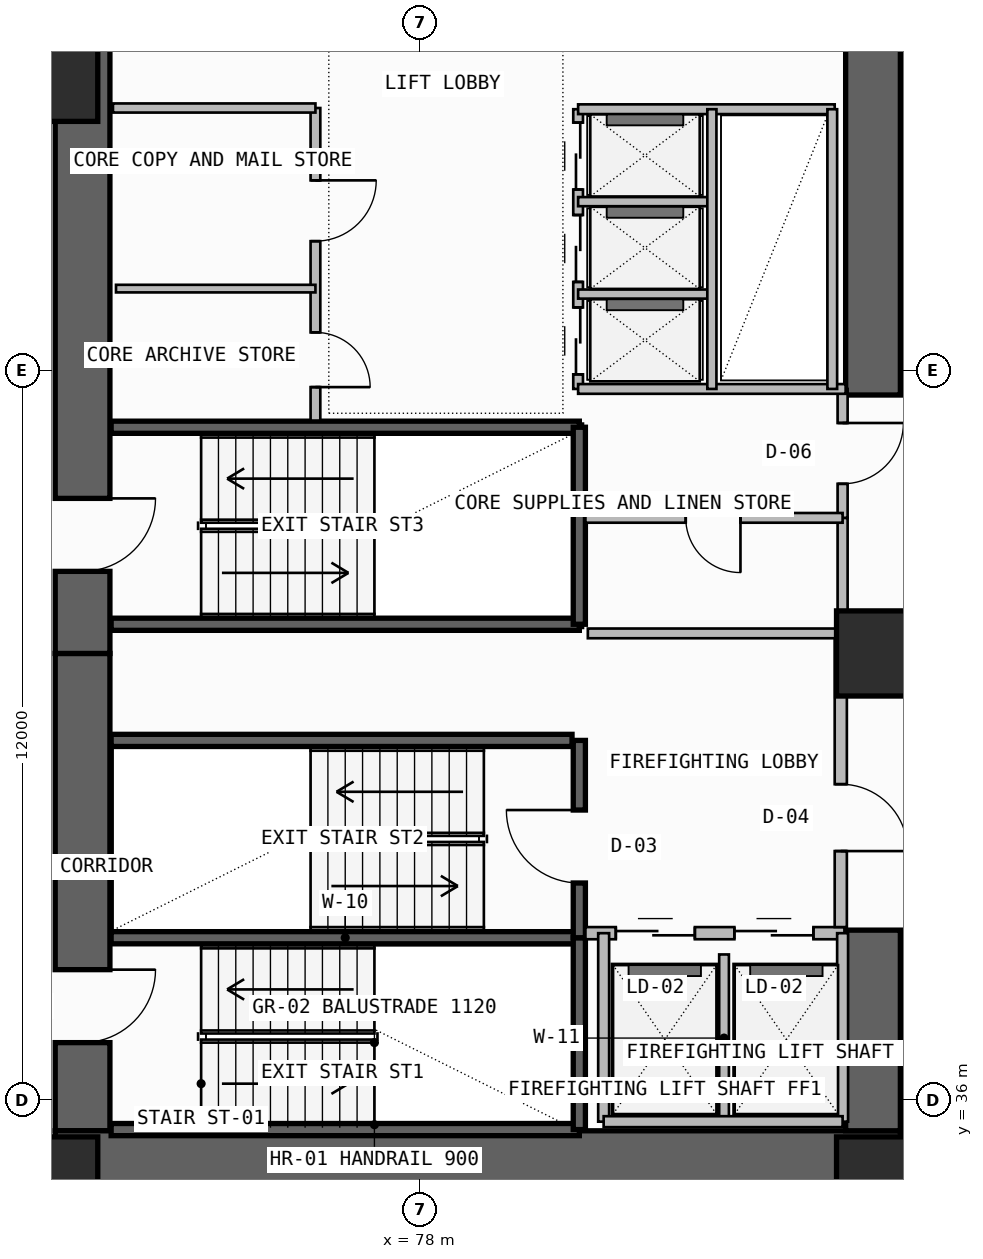
"""IFC4 building model, lengths in metres.
Left out: names, types, materials, properties, quantities, classifications, styles, units other than length and angle.
Written with IfcOpenShell. Run it as: python <this file> out.ifc"""

import sys

from ifc_helpers import new_model, si_unit, direction, frame, frame_2d, origin, origin_2d, place, context, subcontext, project, spatial, rectangle, extrude, element, fill, save


model = new_model("IFC4")
c1 = context("Model", 3, precision=1e-05, world=origin(), true_north=direction((0.0, 1.0)))
c2 = subcontext(c1, "Body", "Model", "MODEL_VIEW")
j1 = project(units=[si_unit("LENGTHUNIT", "METRE"), si_unit("PLANEANGLEUNIT", "RADIAN")], contexts=[c1])
p1 = place(None, origin())
s1 = spatial("IfcSite", under=j1, at=p1, CompositionType="ELEMENT")
p2 = place(p1, origin())
s2 = spatial("IfcBuilding", under=s1, at=p2, CompositionType="ELEMENT")
p3 = place(p2, frame((0.0, 0.0, 157.5)))
s3 = spatial("IfcBuildingStorey", under=s2, at=p3, CompositionType="ELEMENT", Elevation=157.5)
p4 = place(p3, frame((72.45, 35.5, -0.26), z_axis=(0.0, 0.0, 1.0), x_axis=(0.0, 1.0, 0.0)))
e1 = element("IfcWall", 1, at=p4, inside=s3, PredefinedType="SHEAR", context=c2, shape_type="SweptSolid", body=[
    extrude(rectangle(XDim=7.85, YDim=0.9, at=frame_2d((3.925, 0.0))), origin(), (0.0, 0.0, 1.0), 3.6),
])
p5 = place(p4, frame((1.45, 0.0, 0.26)))
e2 = element("IfcOpeningElement", 2, at=p5, cuts=e1, PredefinedType="OPENING", context=c2, shape_type="SweptSolid", body=[
    extrude(rectangle(XDim=1.2, YDim=2.2, at=frame_2d((0.6, 1.1))), frame((0.0, 0.46, 0.0), z_axis=(0.0, -1.0, 0.0), x_axis=(1.0, 0.0, 0.0)), (0.0, 0.0, 1.0), 0.92),
])
p6 = place(p3, frame((72.0, 35.05, -0.26), z_axis=(0.0, 0.0, 1.0), x_axis=(1.0, 0.0, 0.0)))
e3 = element("IfcWall", 3, at=p6, inside=s3, PredefinedType="SHEAR", context=c2, shape_type="SweptSolid", body=[
    extrude(rectangle(XDim=13.9, YDim=0.9, at=frame_2d((6.95, 0.0))), origin(), (0.0, 0.0, 1.0), 3.6),
])
p7 = place(p3, frame((85.45, 35.5, -0.26), z_axis=(0.0, 0.0, 1.0), x_axis=(0.0, 1.0, 0.0)))
e4 = element("IfcWall", 4, at=p7, inside=s3, PredefinedType="SHEAR", context=c2, shape_type="SweptSolid", body=[
    extrude(rectangle(XDim=3.3, YDim=0.9, at=frame_2d((1.65, 0.0))), origin(), (0.0, 0.0, 1.0), 3.6),
])
p8 = place(p3, frame((72.45, 43.35, -0.26), z_axis=(0.0, 0.0, 1.0), x_axis=(0.0, 1.0, 0.0)))
e5 = element("IfcWall", 5, at=p8, inside=s3, PredefinedType="SHEAR", context=c2, shape_type="SweptSolid", body=[
    extrude(rectangle(XDim=12.7, YDim=0.9, at=frame_2d((6.35, 0.0))), origin(), (0.0, 0.0, 1.0), 3.6),
])
p9 = place(p8, frame((1.35, 0.0, 0.26)))
e6 = element("IfcOpeningElement", 6, at=p9, cuts=e5, PredefinedType="OPENING", context=c2, shape_type="SweptSolid", body=[
    extrude(rectangle(XDim=1.2, YDim=2.2, at=frame_2d((0.6, 1.1))), frame((0.0, 0.46, 0.0), z_axis=(0.0, -1.0, 0.0), x_axis=(1.0, 0.0, 0.0)), (0.0, 0.0, 1.0), 0.92),
])
p10 = place(p3, frame((85.45, 47.6, -0.26), z_axis=(0.0, 0.0, 1.0), x_axis=(0.0, 1.0, 0.0)))
e7 = element("IfcWall", 7, at=p10, inside=s3, PredefinedType="SHEAR", context=c2, shape_type="SweptSolid", body=[
    extrude(rectangle(XDim=8.45, YDim=0.9, at=frame_2d((4.225, 0.0))), origin(), (0.0, 0.0, 1.0), 3.6),
])
for number, where, z_axis, x_axis in (
    (8, (72.0, 34.7, 0.0), (0.0, 0.0, 1.0), (1.0, 0.0, 0.0)),
    (9, (85.55, 34.7, 0.0), (0.0, 0.0, 1.0), (1.0, 0.0, 0.0)),
    (10, (85.55, 43.35, 0.0), (0.0, 0.0, 1.0), (1.0, 0.0, 0.0)),
    (11, (72.0, 52.8, 0.0), (0.0, 0.0, 1.0), (1.0, 0.0, 0.0)),
):
    element("IfcColumn", number, at=place(p3, frame(where, z_axis=z_axis, x_axis=x_axis)), inside=s3, PredefinedType="COLUMN", context=c2, shape_type="SweptSolid", body=[
        extrude(rectangle(XDim=1.4, YDim=1.4, at=origin_2d()), origin(), (0.0, 0.0, 1.0), 3.6),
    ])
for number, where, z_axis, x_axis in (
    (12, (72.92, 35.52, -0.26), (0.0, 0.0, 1.0), (1.0, 0.0, 0.0)),
    (13, (72.92, 38.675, -0.26), (0.0, 0.0, 1.0), (1.0, 0.0, 0.0)),
):
    element("IfcWall", number, at=place(p3, frame(where, z_axis=z_axis, x_axis=x_axis)), inside=s3, PredefinedType="SOLIDWALL", context=c2, shape_type="SweptSolid", body=[
        extrude(rectangle(XDim=7.7, YDim=0.2, at=frame_2d((3.85, 0.0))), origin(), (0.0, 0.0, 1.0), 3.6),
    ])
p11 = place(p3, frame((80.62, 35.52, -0.26), z_axis=(0.0, 0.0, 1.0), x_axis=(0.0, 1.0, 0.0)))
e14 = element("IfcWall", 14, at=p11, inside=s3, PredefinedType="SOLIDWALL", context=c2, shape_type="SweptSolid", body=[
    extrude(rectangle(XDim=3.155, YDim=0.2, at=frame_2d((1.578, 0.0))), origin(), (0.0, 0.0, 1.0), 3.6),
])
p12 = place(p3, frame((80.62, 38.675, -0.26), z_axis=(0.0, 0.0, 1.0), x_axis=(0.0, 1.0, 0.0)))
e15 = element("IfcWall", 15, at=p12, inside=s3, PredefinedType="SOLIDWALL", context=c2, shape_type="SweptSolid", body=[
    extrude(rectangle(XDim=3.245, YDim=0.2, at=frame_2d((1.623, 0.0))), origin(), (0.0, 0.0, 1.0), 3.6),
])
p13 = place(p12, frame((0.9, 0.0, 0.26)))
e16 = element("IfcOpeningElement", 16, at=p13, cuts=e15, PredefinedType="OPENING", context=c2, shape_type="SweptSolid", body=[
    extrude(rectangle(XDim=1.2, YDim=2.2, at=frame_2d((0.6, 1.1))), frame((0.0, 0.11, 0.0), z_axis=(0.0, -1.0, 0.0), x_axis=(1.0, 0.0, 0.0)), (0.0, 0.0, 1.0), 0.22),
])
p14 = place(p3, frame((80.72, 38.75, 0.0), z_axis=(0.0, 0.0, 1.0), x_axis=(1.0, 0.0, 0.0)))
e17 = element("IfcWall", 17, at=p14, inside=s3, PredefinedType="SOLIDWALL", context=c2, shape_type="SweptSolid", body=[
    extrude(rectangle(XDim=4.26, YDim=0.2, at=frame_2d((2.13, 0.0))), origin(), (0.0, 0.0, 1.0), 3.34),
])
p15 = place(p14, frame((0.5, 0.0, 0.0)))
e18 = element("IfcOpeningElement", 18, at=p15, cuts=e17, PredefinedType="OPENING", context=c2, shape_type="SweptSolid", body=[
    extrude(rectangle(XDim=1.3, YDim=2.3, at=frame_2d((0.65, 1.15))), frame((0.0, 0.11, 0.0), z_axis=(0.0, -1.0, 0.0), x_axis=(1.0, 0.0, 0.0)), (0.0, 0.0, 1.0), 0.22),
])
p16 = place(p14, frame((2.45, 0.0, 0.0)))
e19 = element("IfcOpeningElement", 19, at=p16, cuts=e17, PredefinedType="OPENING", context=c2, shape_type="SweptSolid", body=[
    extrude(rectangle(XDim=1.3, YDim=2.3, at=frame_2d((0.65, 1.15))), frame((0.0, 0.11, 0.0), z_axis=(0.0, -1.0, 0.0), x_axis=(1.0, 0.0, 0.0)), (0.0, 0.0, 1.0), 0.22),
])
p17 = place(p3, frame((83.0, 35.65, 0.0), z_axis=(0.0, 0.0, 1.0), x_axis=(0.0, 1.0, 0.0)))
e20 = element("IfcWall", 20, at=p17, inside=s3, PredefinedType="PLUMBINGWALL", context=c2, shape_type="SweptSolid", body=[
    extrude(rectangle(XDim=2.75, YDim=0.16, at=frame_2d((1.375, 0.0))), origin(), (0.0, 0.0, 1.0), 3.34),
])
for number, where, z_axis, x_axis in (
    (21, (84.95, 35.65, 0.0), (0.0, 0.0, 1.0), (0.0, 1.0, 0.0)),
    (22, (81.02, 35.65, 0.0), (0.0, 0.0, 1.0), (0.0, 1.0, 0.0)),
):
    element("IfcWall", number, at=place(p3, frame(where, z_axis=z_axis, x_axis=x_axis)), inside=s3, PredefinedType="SOLIDWALL", context=c2, shape_type="SweptSolid", body=[
        extrude(rectangle(XDim=3.1, YDim=0.18, at=frame_2d((1.55, 0.0))), origin(), (0.0, 0.0, 1.0), 3.34),
    ])
p18 = place(p3, frame((81.02, 35.65, 0.0), z_axis=(0.0, 0.0, 1.0), x_axis=(1.0, 0.0, 0.0)))
e23 = element("IfcWall", 23, at=p18, inside=s3, PredefinedType="SOLIDWALL", context=c2, shape_type="SweptSolid", body=[
    extrude(rectangle(XDim=3.93, YDim=0.18, at=frame_2d((1.965, 0.0))), origin(), (0.0, 0.0, 1.0), 3.34),
])
p19 = place(p3, frame((84.92, 38.85, 0.0), z_axis=(0.0, 0.0, 1.0), x_axis=(0.0, 1.0, 0.0)))
e24 = element("IfcWall", 24, at=p19, inside=s3, PredefinedType="SOLIDWALL", context=c2, shape_type="SweptSolid", body=[
    extrude(rectangle(XDim=4.83, YDim=0.2, at=frame_2d((2.415, 0.0))), origin(), (0.0, 0.0, 1.0), 3.34),
])
p20 = place(p19, frame((1.25, 0.0, 0.0)))
e25 = element("IfcOpeningElement", 25, at=p20, cuts=e24, PredefinedType="OPENING", context=c2, shape_type="SweptSolid", body=[
    extrude(rectangle(XDim=1.1, YDim=2.2, at=frame_2d((0.55, 1.1))), frame((0.0, 0.11, 0.0), z_axis=(0.0, -1.0, 0.0), x_axis=(1.0, 0.0, 0.0)), (0.0, 0.0, 1.0), 0.22),
])
p21 = place(p3, frame((72.92, 41.92, -0.26), z_axis=(0.0, 0.0, 1.0), x_axis=(1.0, 0.0, 0.0)))
e26 = element("IfcWall", 26, at=p21, inside=s3, PredefinedType="SOLIDWALL", context=c2, shape_type="SweptSolid", body=[
    extrude(rectangle(XDim=7.58, YDim=0.2, at=frame_2d((3.79, 0.0))), origin(), (0.0, 0.0, 1.0), 3.6),
])
for number, where, z_axis, x_axis in (
    (27, (72.92, 43.83, -0.26), (0.0, 0.0, 1.0), (1.0, 0.0, 0.0)),
    (28, (72.92, 47.07, -0.26), (0.0, 0.0, 1.0), (1.0, 0.0, 0.0)),
):
    element("IfcWall", number, at=place(p3, frame(where, z_axis=z_axis, x_axis=x_axis)), inside=s3, PredefinedType="SOLIDWALL", context=c2, shape_type="SweptSolid", body=[
        extrude(rectangle(XDim=7.7, YDim=0.2, at=frame_2d((3.85, 0.0))), origin(), (0.0, 0.0, 1.0), 3.6),
    ])
p22 = place(p3, frame((80.62, 43.83, -0.26), z_axis=(0.0, 0.0, 1.0), x_axis=(0.0, 1.0, 0.0)))
e29 = element("IfcWall", 29, at=p22, inside=s3, PredefinedType="SOLIDWALL", context=c2, shape_type="SweptSolid", body=[
    extrude(rectangle(XDim=3.24, YDim=0.2, at=frame_2d((1.62, 0.0))), origin(), (0.0, 0.0, 1.0), 3.6),
])
p23 = place(p3, frame((84.95, 43.68, 0.0), z_axis=(0.0, 0.0, 1.0), x_axis=(0.0, 1.0, 0.0)))
e30 = element("IfcWall", 30, at=p23, inside=s3, PredefinedType="PLUMBINGWALL", context=c2, shape_type="SweptSolid", body=[
    extrude(rectangle(XDim=1.9, YDim=0.165, at=frame_2d((0.95, 0.0))), origin(), (0.0, 0.0, 1.0), 3.34),
])
p24 = place(p3, frame((84.95, 45.58, 0.0), z_axis=(0.0, 0.0, 1.0), x_axis=(0.0, 1.0, 0.0)))
e31 = element("IfcWall", 31, at=p24, inside=s3, PredefinedType="PARTITIONING", context=c2, shape_type="SweptSolid", body=[
    extrude(rectangle(XDim=2.12, YDim=0.165, at=frame_2d((1.06, 0.0))), origin(), (0.0, 0.0, 1.0), 3.34),
])
p25 = place(p24, frame((0.56, 0.0, 0.0)))
e32 = element("IfcOpeningElement", 32, at=p25, cuts=e31, PredefinedType="OPENING", context=c2, shape_type="SweptSolid", body=[
    extrude(rectangle(XDim=1.0, YDim=2.2, at=frame_2d((0.5, 1.1))), frame((0.0, 0.093, 0.0), z_axis=(0.0, -1.0, 0.0), x_axis=(1.0, 0.0, 0.0)), (0.0, 0.0, 1.0), 0.185),
])
p26 = place(p3, frame((80.72, 45.58, 0.0), z_axis=(0.0, 0.0, 1.0), x_axis=(1.0, 0.0, 0.0)))
e33 = element("IfcWall", 33, at=p26, inside=s3, PredefinedType="PLUMBINGWALL", context=c2, shape_type="SweptSolid", body=[
    extrude(rectangle(XDim=4.23, YDim=0.16, at=frame_2d((2.115, 0.0))), origin(), (0.0, 0.0, 1.0), 3.34),
])
p27 = place(p26, frame((1.65, 0.0, 0.0)))
e34 = element("IfcOpeningElement", 34, at=p27, cuts=e33, PredefinedType="OPENING", context=c2, shape_type="SweptSolid", body=[
    extrude(rectangle(XDim=0.9, YDim=2.1, at=frame_2d((0.45, 1.05))), frame((0.0, 0.09, 0.0), z_axis=(0.0, -1.0, 0.0), x_axis=(1.0, 0.0, 0.0)), (0.0, 0.0, 1.0), 0.18),
])
p28 = place(p3, frame((80.76, 43.68, 0.0), z_axis=(0.0, 0.0, 1.0), x_axis=(1.0, 0.0, 0.0)))
e35 = element("IfcWall", 35, at=p28, inside=s3, PredefinedType="PLUMBINGWALL", context=c2, shape_type="SweptSolid", body=[
    extrude(rectangle(XDim=4.19, YDim=0.16, at=frame_2d((2.095, 0.0))), origin(), (0.0, 0.0, 1.0), 3.34),
])
p29 = place(p3, frame((76.28, 47.18, 0.0), z_axis=(0.0, 0.0, 1.0), x_axis=(0.0, 1.0, 0.0)))
e36 = element("IfcWall", 36, at=p29, inside=s3, PredefinedType="SOLIDWALL", context=c2, shape_type="SweptSolid", body=[
    extrude(rectangle(XDim=5.14, YDim=0.16, at=frame_2d((2.57, 0.0))), origin(), (0.0, 0.0, 1.0), 3.34),
])
p30 = place(p29, frame((0.55, 0.0, 0.0)))
e37 = element("IfcOpeningElement", 37, at=p30, cuts=e36, PredefinedType="OPENING", context=c2, shape_type="SweptSolid", body=[
    extrude(rectangle(XDim=0.9, YDim=2.1, at=frame_2d((0.45, 1.05))), frame((0.0, 0.09, 0.0), z_axis=(0.0, -1.0, 0.0), x_axis=(1.0, 0.0, 0.0)), (0.0, 0.0, 1.0), 0.18),
])
p31 = place(p29, frame((2.95, 0.0, 0.0)))
e38 = element("IfcOpeningElement", 38, at=p31, cuts=e36, PredefinedType="OPENING", context=c2, shape_type="SweptSolid", body=[
    extrude(rectangle(XDim=1.0, YDim=2.2, at=frame_2d((0.5, 1.1))), frame((0.0, 0.09, 0.0), z_axis=(0.0, -1.0, 0.0), x_axis=(1.0, 0.0, 0.0)), (0.0, 0.0, 1.0), 0.18),
])
p32 = place(p3, frame((72.95, 52.32, 0.0), z_axis=(0.0, 0.0, 1.0), x_axis=(1.0, 0.0, 0.0)))
e39 = element("IfcWall", 39, at=p32, inside=s3, PredefinedType="SOLIDWALL", context=c2, shape_type="SweptSolid", body=[
    extrude(rectangle(XDim=3.33, YDim=0.15, at=frame_2d((1.665, 0.0))), origin(), (0.0, 0.0, 1.0), 3.34),
])
p33 = place(p3, frame((73.0, 49.35, 0.0), z_axis=(0.0, 0.0, 1.0), x_axis=(1.0, 0.0, 0.0)))
e40 = element("IfcWall", 40, at=p33, inside=s3, PredefinedType="PARTITIONING", context=c2, shape_type="SweptSolid", body=[
    extrude(rectangle(XDim=3.28, YDim=0.125, at=frame_2d((1.64, 0.0))), origin(), (0.0, 0.0, 1.0), 3.34),
])
p34 = place(p3, frame((80.6, 47.7, 0.0), z_axis=(0.0, 0.0, 1.0), x_axis=(0.0, 1.0, 0.0)))
e41 = element("IfcWall", 41, at=p34, inside=s3, PredefinedType="SOLIDWALL", context=c2, shape_type="SweptSolid", body=[
    extrude(rectangle(XDim=4.6, YDim=0.16, at=frame_2d((2.3, 0.0))), origin(), (0.0, 0.0, 1.0), 3.34),
])
p35 = place(p34, frame((0.24, 0.0, 0.0)))
e42 = element("IfcOpeningElement", 42, at=p35, cuts=e41, PredefinedType="OPENING", context=c2, shape_type="SweptSolid", body=[
    extrude(rectangle(XDim=1.1, YDim=2.25, at=frame_2d((0.55, 1.125))), frame((0.0, 0.09, 0.0), z_axis=(0.0, -1.0, 0.0), x_axis=(1.0, 0.0, 0.0)), (0.0, 0.0, 1.0), 0.18),
])
p36 = place(p34, frame((1.76, 0.0, 0.0)))
e43 = element("IfcOpeningElement", 43, at=p36, cuts=e41, PredefinedType="OPENING", context=c2, shape_type="SweptSolid", body=[
    extrude(rectangle(XDim=1.1, YDim=2.25, at=frame_2d((0.55, 1.125))), frame((0.0, 0.09, 0.0), z_axis=(0.0, -1.0, 0.0), x_axis=(1.0, 0.0, 0.0)), (0.0, 0.0, 1.0), 0.18),
])
p37 = place(p34, frame((3.28, 0.0, 0.0)))
e44 = element("IfcOpeningElement", 44, at=p37, cuts=e41, PredefinedType="OPENING", context=c2, shape_type="SweptSolid", body=[
    extrude(rectangle(XDim=1.1, YDim=2.25, at=frame_2d((0.55, 1.125))), frame((0.0, 0.09, 0.0), z_axis=(0.0, -1.0, 0.0), x_axis=(1.0, 0.0, 0.0)), (0.0, 0.0, 1.0), 0.18),
])
p38 = place(p3, frame((80.6, 47.7, 0.0), z_axis=(0.0, 0.0, 1.0), x_axis=(1.0, 0.0, 0.0)))
e45 = element("IfcWall", 45, at=p38, inside=s3, PredefinedType="SOLIDWALL", context=c2, shape_type="SweptSolid", body=[
    extrude(rectangle(XDim=4.4, YDim=0.16, at=frame_2d((2.2, 0.0))), origin(), (0.0, 0.0, 1.0), 3.34),
])
p39 = place(p3, frame((80.6, 52.3, 0.0), z_axis=(0.0, 0.0, 1.0), x_axis=(1.0, 0.0, 0.0)))
e46 = element("IfcWall", 46, at=p39, inside=s3, PredefinedType="SOLIDWALL", context=c2, shape_type="SweptSolid", body=[
    extrude(rectangle(XDim=4.22, YDim=0.16, at=frame_2d((2.11, 0.0))), origin(), (0.0, 0.0, 1.0), 3.34),
])
for number, where, z_axis, x_axis in (
    (47, (80.6, 49.26, 0.0), (0.0, 0.0, 1.0), (1.0, 0.0, 0.0)),
    (48, (80.6, 50.78, 0.0), (0.0, 0.0, 1.0), (1.0, 0.0, 0.0)),
):
    element("IfcWall", number, at=place(p3, frame(where, z_axis=z_axis, x_axis=x_axis)), inside=s3, PredefinedType="PLUMBINGWALL", context=c2, shape_type="SweptSolid", body=[
        extrude(rectangle(XDim=2.2, YDim=0.15, at=frame_2d((1.1, 0.0))), origin(), (0.0, 0.0, 1.0), 3.34),
    ])
p40 = place(p3, frame((82.8, 47.7, 0.0), z_axis=(0.0, 0.0, 1.0), x_axis=(0.0, 1.0, 0.0)))
e49 = element("IfcWall", 49, at=p40, inside=s3, PredefinedType="PLUMBINGWALL", context=c2, shape_type="SweptSolid", body=[
    extrude(rectangle(XDim=4.6, YDim=0.15, at=frame_2d((2.3, 0.0))), origin(), (0.0, 0.0, 1.0), 3.34),
])
p41 = place(p3, frame((84.78, 47.7, 0.0), z_axis=(0.0, 0.0, 1.0), x_axis=(0.0, 1.0, 0.0)))
e50 = element("IfcWall", 50, at=p41, inside=s3, PredefinedType="SOLIDWALL", context=c2, shape_type="SweptSolid", body=[
    extrude(rectangle(XDim=4.6, YDim=0.16, at=frame_2d((2.3, 0.0))), origin(), (0.0, 0.0, 1.0), 3.34),
])
p42 = place(p5, frame((1.2, 0.0, 0.0), z_axis=(0.0, 0.0, 1.0), x_axis=(-1.0, 0.0, 0.0)))
e51 = element("IfcDoor", 51, at=p42, inside=s3, OperationType="SINGLE_SWING_LEFT", PredefinedType="USERDEFINED", context=c2, shape_type="SweptSolid", body=[
    extrude(rectangle(XDim=1.2, YDim=2.2, at=frame_2d((0.6, 1.1))), frame((0.0, 0.025, 0.0), z_axis=(0.0, -1.0, 0.0), x_axis=(1.0, 0.0, 0.0)), (0.0, 0.0, 1.0), 0.05),
])
fill(e2, e51)
p43 = place(p13, origin())
e52 = element("IfcDoor", 52, at=p43, inside=s3, OperationType="SINGLE_SWING_RIGHT", PredefinedType="USERDEFINED", context=c2, shape_type="SweptSolid", body=[
    extrude(rectangle(XDim=1.2, YDim=2.2, at=frame_2d((0.6, 1.1))), frame((0.0, 0.025, 0.0), z_axis=(0.0, -1.0, 0.0), x_axis=(1.0, 0.0, 0.0)), (0.0, 0.0, 1.0), 0.05),
])
fill(e16, e52)
p44 = place(p15, origin())
e53 = element("IfcDoor", 53, at=p44, inside=s3, OperationType="DOUBLE_DOOR_SLIDING", PredefinedType="DOOR", context=c2, shape_type="SweptSolid", body=[
    extrude(rectangle(XDim=1.3, YDim=2.3, at=frame_2d((0.65, 1.15))), frame((0.0, 0.025, 0.0), z_axis=(0.0, -1.0, 0.0), x_axis=(1.0, 0.0, 0.0)), (0.0, 0.0, 1.0), 0.05),
])
fill(e18, e53)
p45 = place(p16, origin())
e54 = element("IfcDoor", 54, at=p45, inside=s3, OperationType="DOUBLE_DOOR_SLIDING", PredefinedType="DOOR", context=c2, shape_type="SweptSolid", body=[
    extrude(rectangle(XDim=1.3, YDim=2.3, at=frame_2d((0.65, 1.15))), frame((0.0, 0.025, 0.0), z_axis=(0.0, -1.0, 0.0), x_axis=(1.0, 0.0, 0.0)), (0.0, 0.0, 1.0), 0.05),
])
fill(e19, e54)
p46 = place(p20, frame((1.1, 0.0, 0.0), z_axis=(0.0, 0.0, 1.0), x_axis=(-1.0, 0.0, 0.0)))
e55 = element("IfcDoor", 55, at=p46, inside=s3, OperationType="SINGLE_SWING_RIGHT", PredefinedType="DOOR", context=c2, shape_type="SweptSolid", body=[
    extrude(rectangle(XDim=1.1, YDim=2.2, at=frame_2d((0.55, 1.1))), frame((0.0, 0.025, 0.0), z_axis=(0.0, -1.0, 0.0), x_axis=(1.0, 0.0, 0.0)), (0.0, 0.0, 1.0), 0.05),
])
fill(e25, e55)
p47 = place(p9, frame((1.2, 0.0, 0.0), z_axis=(0.0, 0.0, 1.0), x_axis=(-1.0, 0.0, 0.0)))
e56 = element("IfcDoor", 56, at=p47, inside=s3, OperationType="SINGLE_SWING_LEFT", PredefinedType="USERDEFINED", context=c2, shape_type="SweptSolid", body=[
    extrude(rectangle(XDim=1.2, YDim=2.2, at=frame_2d((0.6, 1.1))), frame((0.0, 0.025, 0.0), z_axis=(0.0, -1.0, 0.0), x_axis=(1.0, 0.0, 0.0)), (0.0, 0.0, 1.0), 0.05),
])
fill(e6, e56)
p48 = place(p25, frame((1.0, 0.0, 0.0), z_axis=(0.0, 0.0, 1.0), x_axis=(-1.0, 0.0, 0.0)))
e57 = element("IfcDoor", 57, at=p48, inside=s3, OperationType="SINGLE_SWING_LEFT", PredefinedType="DOOR", context=c2, shape_type="SweptSolid", body=[
    extrude(rectangle(XDim=1.0, YDim=2.2, at=frame_2d((0.5, 1.1))), frame((0.0, 0.025, 0.0), z_axis=(0.0, -1.0, 0.0), x_axis=(1.0, 0.0, 0.0)), (0.0, 0.0, 1.0), 0.05),
])
fill(e32, e57)
p49 = place(p27, frame((0.9, 0.0, 0.0), z_axis=(0.0, 0.0, 1.0), x_axis=(-1.0, 0.0, 0.0)))
e58 = element("IfcDoor", 58, at=p49, inside=s3, OperationType="SINGLE_SWING_LEFT", PredefinedType="DOOR", context=c2, shape_type="SweptSolid", body=[
    extrude(rectangle(XDim=0.9, YDim=2.1, at=frame_2d((0.45, 1.05))), frame((0.0, 0.025, 0.0), z_axis=(0.0, -1.0, 0.0), x_axis=(1.0, 0.0, 0.0)), (0.0, 0.0, 1.0), 0.05),
])
fill(e34, e58)
p50 = place(p30, frame((0.9, 0.0, 0.0), z_axis=(0.0, 0.0, 1.0), x_axis=(-1.0, 0.0, 0.0)))
e59 = element("IfcDoor", 59, at=p50, inside=s3, OperationType="SINGLE_SWING_RIGHT", PredefinedType="DOOR", context=c2, shape_type="SweptSolid", body=[
    extrude(rectangle(XDim=0.9, YDim=2.1, at=frame_2d((0.45, 1.05))), frame((0.0, 0.025, 0.0), z_axis=(0.0, -1.0, 0.0), x_axis=(1.0, 0.0, 0.0)), (0.0, 0.0, 1.0), 0.05),
])
fill(e37, e59)
p51 = place(p31, frame((1.0, 0.0, 0.0), z_axis=(0.0, 0.0, 1.0), x_axis=(-1.0, 0.0, 0.0)))
e60 = element("IfcDoor", 60, at=p51, inside=s3, OperationType="SINGLE_SWING_LEFT", PredefinedType="DOOR", context=c2, shape_type="SweptSolid", body=[
    extrude(rectangle(XDim=1.0, YDim=2.2, at=frame_2d((0.5, 1.1))), frame((0.0, 0.025, 0.0), z_axis=(0.0, -1.0, 0.0), x_axis=(1.0, 0.0, 0.0)), (0.0, 0.0, 1.0), 0.05),
])
fill(e38, e60)
p52 = place(p35, frame((1.1, 0.0, 0.0), z_axis=(0.0, 0.0, 1.0), x_axis=(-1.0, 0.0, 0.0)))
e61 = element("IfcDoor", 61, at=p52, inside=s3, OperationType="DOUBLE_DOOR_SLIDING", PredefinedType="DOOR", context=c2, shape_type="SweptSolid", body=[
    extrude(rectangle(XDim=1.1, YDim=2.25, at=frame_2d((0.55, 1.125))), frame((0.0, 0.025, 0.0), z_axis=(0.0, -1.0, 0.0), x_axis=(1.0, 0.0, 0.0)), (0.0, 0.0, 1.0), 0.05),
])
fill(e42, e61)
p53 = place(p36, frame((1.1, 0.0, 0.0), z_axis=(0.0, 0.0, 1.0), x_axis=(-1.0, 0.0, 0.0)))
e62 = element("IfcDoor", 62, at=p53, inside=s3, OperationType="DOUBLE_DOOR_SLIDING", PredefinedType="DOOR", context=c2, shape_type="SweptSolid", body=[
    extrude(rectangle(XDim=1.1, YDim=2.25, at=frame_2d((0.55, 1.125))), frame((0.0, 0.025, 0.0), z_axis=(0.0, -1.0, 0.0), x_axis=(1.0, 0.0, 0.0)), (0.0, 0.0, 1.0), 0.05),
])
fill(e43, e62)
p54 = place(p37, frame((1.1, 0.0, 0.0), z_axis=(0.0, 0.0, 1.0), x_axis=(-1.0, 0.0, 0.0)))
e63 = element("IfcDoor", 63, at=p54, inside=s3, OperationType="DOUBLE_DOOR_SLIDING", PredefinedType="DOOR", context=c2, shape_type="SweptSolid", body=[
    extrude(rectangle(XDim=1.1, YDim=2.25, at=frame_2d((0.55, 1.125))), frame((0.0, 0.025, 0.0), z_axis=(0.0, -1.0, 0.0), x_axis=(1.0, 0.0, 0.0)), (0.0, 0.0, 1.0), 0.05),
])
fill(e44, e63)
save(model, sys.argv[1])
